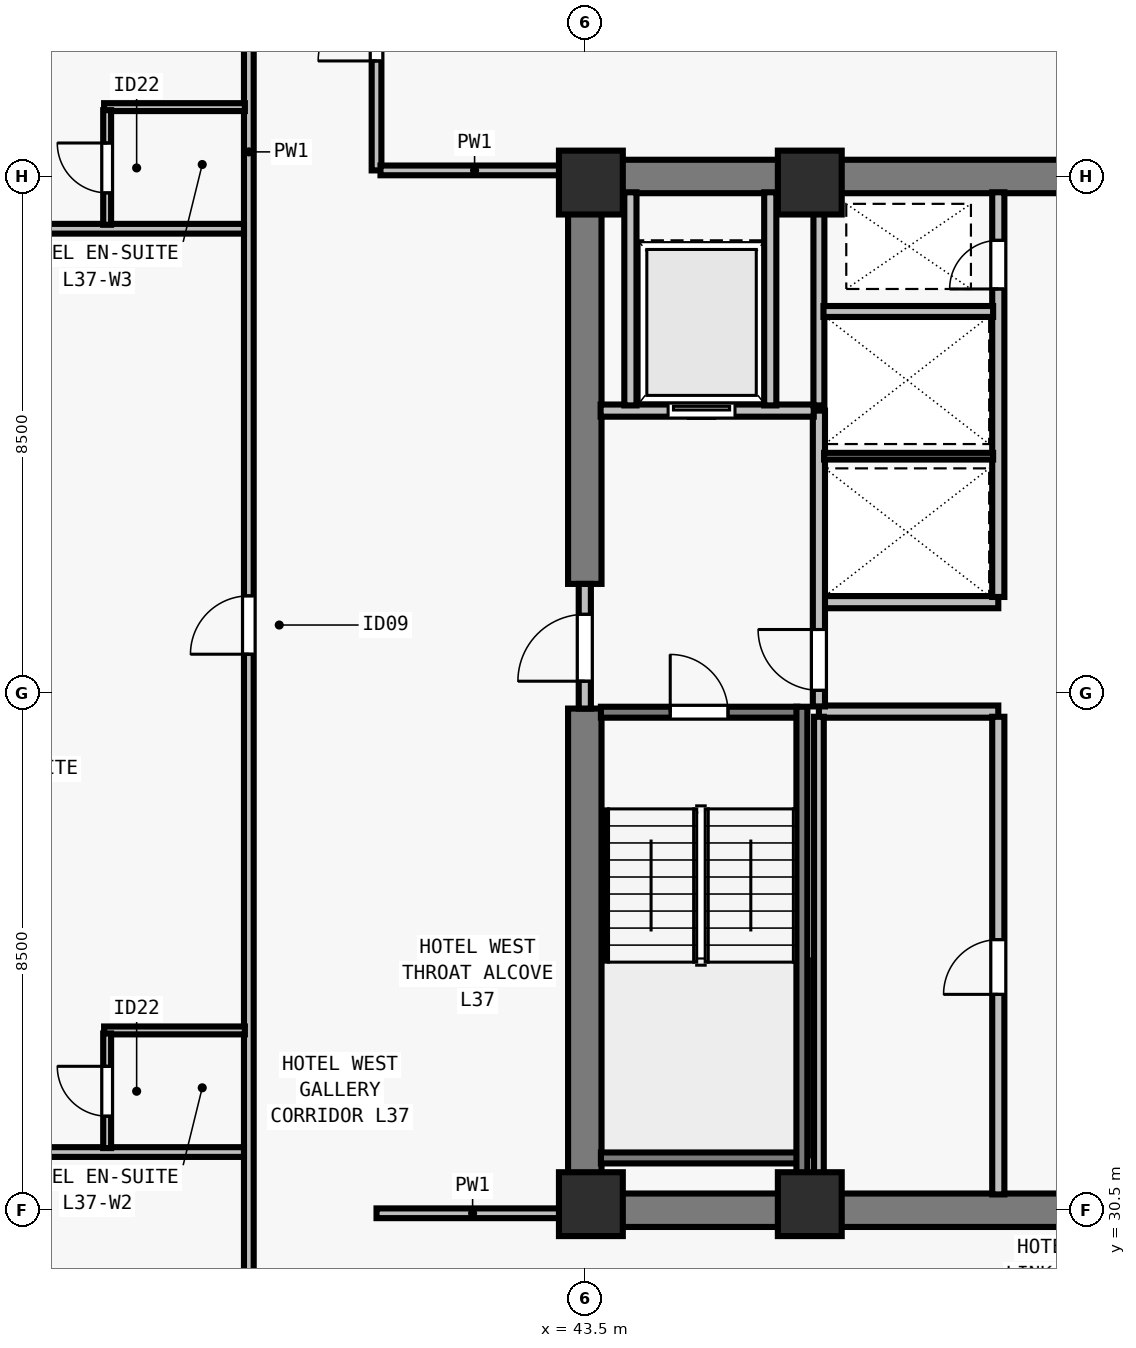
"""IFC4 building model, lengths in metres.
Left out: names, types, materials, properties, quantities, classifications, styles, units other than length and angle.
Written with IfcOpenShell. Run it as: python <this file> out.ifc"""

import sys

from ifc_helpers import new_model, si_unit, direction, frame, frame_2d, origin, origin_2d, place, context, subcontext, project, spatial, rectangle, extrude, element, fill, save


model = new_model("IFC4")
c1 = context("Model", 3, precision=1e-05, world=origin(), true_north=direction((0.0, 1.0)))
c2 = subcontext(c1, "Body", "Model", "MODEL_VIEW")
j1 = project(units=[si_unit("LENGTHUNIT", "METRE"), si_unit("PLANEANGLEUNIT", "RADIAN")], contexts=[c1])
p1 = place(None, origin())
s1 = spatial("IfcSite", under=j1, at=p1, CompositionType="ELEMENT")
p2 = place(p1, origin())
s2 = spatial("IfcBuilding", under=s1, at=p2, CompositionType="ELEMENT")
p3 = place(p2, frame((0.0, 0.0, 137.5)))
s3 = spatial("IfcBuildingStorey", under=s2, at=p3, CompositionType="ELEMENT", Elevation=137.5)
for number, where, z_axis, x_axis in (
    (1, (43.6, 30.6, 0.0), (0.0, 0.0, 1.0), (1.0, 0.0, 0.0)),
    (2, (47.2, 30.6, 0.0), (0.0, 0.0, 1.0), (1.0, 0.0, 0.0)),
    (3, (43.6, 47.4, 0.0), (0.0, 0.0, 1.0), (1.0, 0.0, 0.0)),
    (4, (47.2, 47.4, 0.0), (0.0, 0.0, 1.0), (1.0, 0.0, 0.0)),
):
    element("IfcColumn", number, at=place(p3, frame(where, z_axis=z_axis, x_axis=x_axis)), inside=s3, PredefinedType="COLUMN", context=c2, shape_type="SweptSolid", body=[
        extrude(rectangle(XDim=1.05, YDim=1.05, at=origin_2d()), origin(), (0.0, 0.0, 1.0), 3.5),
    ])
for number, where, z_axis, x_axis in (
    (5, (43.225, 30.5, 0.0), (0.0, 0.0, 1.0), (1.0, 0.0, 0.0)),
    (6, (43.225, 47.5, 0.0), (0.0, 0.0, 1.0), (1.0, 0.0, 0.0)),
):
    element("IfcWall", number, at=place(p3, frame(where, z_axis=z_axis, x_axis=x_axis)), inside=s3, PredefinedType="SHEAR", context=c2, shape_type="SweptSolid", body=[
        extrude(rectangle(XDim=17.55, YDim=0.55, at=frame_2d((8.775, 0.0))), origin(), (0.0, 0.0, 1.0), 3.28),
    ])
p4 = place(p3, frame((43.5, 30.765, 0.0), z_axis=(0.0, 0.0, 1.0), x_axis=(0.0, 1.0, 0.0)))
e7 = element("IfcWall", 7, at=p4, inside=s3, PredefinedType="SHEAR", context=c2, shape_type="SweptSolid", body=[
    extrude(rectangle(XDim=7.985, YDim=0.55, at=frame_2d((3.993, 0.0))), origin(), (0.0, 0.0, 1.0), 3.28),
])
p5 = place(p3, frame((43.5, 40.8, 0.0), z_axis=(0.0, 0.0, 1.0), x_axis=(0.0, 1.0, 0.0)))
e8 = element("IfcWall", 8, at=p5, inside=s3, PredefinedType="SHEAR", context=c2, shape_type="SweptSolid", body=[
    extrude(rectangle(XDim=6.435, YDim=0.55, at=frame_2d((3.218, 0.0))), origin(), (0.0, 0.0, 1.0), 3.28),
])
for number, where, z_axis, x_axis in (
    (9, (47.35, 38.7, 0.0), (0.0, 0.0, 1.0), (1.0, 0.0, 0.0)),
    (10, (47.35, 40.5, 0.0), (0.0, 0.0, 1.0), (1.0, 0.0, 0.0)),
):
    element("IfcWall", number, at=place(p3, frame(where, z_axis=z_axis, x_axis=x_axis)), inside=s3, PredefinedType="SOLIDWALL", context=c2, shape_type="SweptSolid", body=[
        extrude(rectangle(XDim=2.95, YDim=0.2, at=frame_2d((1.475, 0.0))), origin(), (0.0, 0.0, 1.0), 3.28),
    ])
p6 = place(p3, frame((50.3, 30.76, 0.0), z_axis=(0.0, 0.0, 1.0), x_axis=(0.0, 1.0, 0.0)))
e11 = element("IfcWall", 11, at=p6, inside=s3, PredefinedType="SOLIDWALL", context=c2, shape_type="SweptSolid", body=[
    extrude(rectangle(XDim=7.855, YDim=0.2, at=frame_2d((3.927, 0.0))), origin(), (0.0, 0.0, 1.0), 3.28),
])
p7 = place(p6, frame((3.29, 0.0, 0.0)))
e12 = element("IfcOpeningElement", 12, at=p7, cuts=e11, PredefinedType="OPENING", context=c2, shape_type="SweptSolid", body=[
    extrude(rectangle(XDim=0.9, YDim=2.12, at=frame_2d((0.45, 1.06))), frame((0.0, 0.11, 0.0), z_axis=(0.0, -1.0, 0.0), x_axis=(1.0, 0.0, 0.0)), (0.0, 0.0, 1.0), 0.22),
])
p8 = place(p3, frame((50.3, 40.585, 0.0), z_axis=(0.0, 0.0, 1.0), x_axis=(0.0, 1.0, 0.0)))
e13 = element("IfcWall", 13, at=p8, inside=s3, PredefinedType="SOLIDWALL", context=c2, shape_type="SweptSolid", body=[
    extrude(rectangle(XDim=6.655, YDim=0.2, at=frame_2d((3.328, 0.0))), origin(), (0.0, 0.0, 1.0), 3.28),
])
p9 = place(p8, frame((5.065, 0.0, 0.0)))
e14 = element("IfcOpeningElement", 14, at=p9, cuts=e13, PredefinedType="OPENING", context=c2, shape_type="SweptSolid", body=[
    extrude(rectangle(XDim=0.8, YDim=2.08, at=frame_2d((0.4, 1.04))), frame((0.0, 0.11, 0.0), z_axis=(0.0, -1.0, 0.0), x_axis=(1.0, 0.0, 0.0)), (0.0, 0.0, 1.0), 0.22),
])
p10 = place(p3, frame((43.5, 38.75, 0.0), z_axis=(0.0, 0.0, 1.0), x_axis=(0.0, 1.0, 0.0)))
e15 = element("IfcWall", 15, at=p10, inside=s3, PredefinedType="SOLIDWALL", context=c2, shape_type="SweptSolid", body=[
    extrude(rectangle(XDim=2.05, YDim=0.2, at=frame_2d((1.025, 0.0))), origin(), (0.0, 0.0, 1.0), 3.28),
])
p11 = place(p10, frame((0.45, 0.0, 0.0)))
e16 = element("IfcOpeningElement", 16, at=p11, cuts=e15, PredefinedType="OPENING", context=c2, shape_type="SweptSolid", body=[
    extrude(rectangle(XDim=1.1, YDim=2.15, at=frame_2d((0.55, 1.075))), frame((0.0, 0.11, 0.0), z_axis=(0.0, -1.0, 0.0), x_axis=(1.0, 0.0, 0.0)), (0.0, 0.0, 1.0), 0.22),
])
p12 = place(p3, frame((47.35, 38.785, 0.0), z_axis=(0.0, 0.0, 1.0), x_axis=(0.0, 1.0, 0.0)))
e17 = element("IfcWall", 17, at=p12, inside=s3, PredefinedType="SOLIDWALL", context=c2, shape_type="SweptSolid", body=[
    extrude(rectangle(XDim=4.865, YDim=0.2, at=frame_2d((2.433, 0.0))), origin(), (0.0, 0.0, 1.0), 3.28),
])
p13 = place(p12, frame((0.265, 0.0, 0.0)))
e18 = element("IfcOpeningElement", 18, at=p13, cuts=e17, PredefinedType="OPENING", context=c2, shape_type="SweptSolid", body=[
    extrude(rectangle(XDim=1.0, YDim=2.15, at=frame_2d((0.5, 1.075))), frame((0.0, 0.11, 0.0), z_axis=(0.0, -1.0, 0.0), x_axis=(1.0, 0.0, 0.0)), (0.0, 0.0, 1.0), 0.22),
])
p14 = place(p3, frame((43.76, 43.65, 0.0), z_axis=(0.0, 0.0, 1.0), x_axis=(1.0, 0.0, 0.0)))
e19 = element("IfcWall", 19, at=p14, inside=s3, PredefinedType="SOLIDWALL", context=c2, shape_type="SweptSolid", body=[
    extrude(rectangle(XDim=3.505, YDim=0.2, at=frame_2d((1.752, 0.0))), origin(), (0.0, 0.0, 1.0), 3.28),
])
p15 = place(p14, frame((1.11, 0.0, 0.0)))
e20 = element("IfcOpeningElement", 20, at=p15, cuts=e19, PredefinedType="OPENING", context=c2, shape_type="SweptSolid", body=[
    extrude(rectangle(XDim=1.1, YDim=2.2, at=frame_2d((0.55, 1.1))), frame((0.0, 0.11, 0.0), z_axis=(0.0, -1.0, 0.0), x_axis=(1.0, 0.0, 0.0)), (0.0, 0.0, 1.0), 0.22),
])
for number, where, z_axis, x_axis in (
    (21, (46.55, 43.735, 0.0), (0.0, 0.0, 1.0), (0.0, 1.0, 0.0)),
    (22, (44.25, 43.735, 0.0), (0.0, 0.0, 1.0), (0.0, 1.0, 0.0)),
):
    element("IfcWall", number, at=place(p3, frame(where, z_axis=z_axis, x_axis=x_axis)), inside=s3, PredefinedType="SOLIDWALL", context=c2, shape_type="SweptSolid", body=[
        extrude(rectangle(XDim=3.505, YDim=0.2, at=frame_2d((1.752, 0.0))), origin(), (0.0, 0.0, 1.0), 3.28),
    ])
p16 = place(p3, frame((47.35, 30.76, 0.0), z_axis=(0.0, 0.0, 1.0), x_axis=(0.0, 1.0, 0.0)))
e23 = element("IfcWall", 23, at=p16, inside=s3, PredefinedType="PARTITIONING", context=c2, shape_type="SweptSolid", body=[
    extrude(rectangle(XDim=7.855, YDim=0.16, at=frame_2d((3.927, 0.0))), origin(), (0.0, 0.0, 1.0), 3.28),
])
p17 = place(p3, frame((47.35, 43.735, 0.0), z_axis=(0.0, 0.0, 1.0), x_axis=(0.0, 1.0, 0.0)))
e24 = element("IfcWall", 24, at=p17, inside=s3, PredefinedType="SOLIDWALL", context=c2, shape_type="SweptSolid", body=[
    extrude(rectangle(XDim=3.505, YDim=0.18, at=frame_2d((1.752, 0.0))), origin(), (0.0, 0.0, 1.0), 3.28),
])
p18 = place(p3, frame((47.435, 42.9, 0.0), z_axis=(0.0, 0.0, 1.0), x_axis=(1.0, 0.0, 0.0)))
e25 = element("IfcWall", 25, at=p18, inside=s3, PredefinedType="PARTITIONING", context=c2, shape_type="SweptSolid", body=[
    extrude(rectangle(XDim=2.78, YDim=0.11, at=frame_2d((1.39, 0.0))), origin(), (0.0, 0.0, 1.0), 3.28),
])
p19 = place(p3, frame((47.425, 45.28, 0.0), z_axis=(0.0, 0.0, 1.0), x_axis=(1.0, 0.0, 0.0)))
e26 = element("IfcWall", 26, at=p19, inside=s3, PredefinedType="SOLIDWALL", context=c2, shape_type="SweptSolid", body=[
    extrude(rectangle(XDim=2.79, YDim=0.18, at=frame_2d((1.395, 0.0))), origin(), (0.0, 0.0, 1.0), 3.28),
])
p20 = place(p3, frame((37.975, 15.325, 0.0), z_axis=(0.0, 0.0, 1.0), x_axis=(0.0, 1.0, 0.0)))
e27 = element("IfcWall", 27, at=p20, inside=s3, PredefinedType="PARTITIONING", context=c2, shape_type="SweptSolid", body=[
    extrude(rectangle(XDim=47.35, YDim=0.16, at=frame_2d((23.675, 0.0))), origin(), (0.0, 0.0, 1.0), 2.555),
])
p21 = place(p20, frame((8.934, 0.0, 0.0)))
e28 = element("IfcOpeningElement", 28, at=p21, cuts=e27, PredefinedType="OPENING", context=c2, shape_type="SweptSolid", body=[
    extrude(rectangle(XDim=0.96, YDim=2.15, at=frame_2d((0.48, 1.075))), frame((0.0, 0.09, 0.0), z_axis=(0.0, -1.0, 0.0), x_axis=(1.0, 0.0, 0.0)), (0.0, 0.0, 1.0), 0.18),
])
p22 = place(p20, frame((24.319, 0.0, 0.0)))
e29 = element("IfcOpeningElement", 29, at=p22, cuts=e27, PredefinedType="OPENING", context=c2, shape_type="SweptSolid", body=[
    extrude(rectangle(XDim=0.96, YDim=2.15, at=frame_2d((0.48, 1.075))), frame((0.0, 0.09, 0.0), z_axis=(0.0, -1.0, 0.0), x_axis=(1.0, 0.0, 0.0)), (0.0, 0.0, 1.0), 0.18),
])
p23 = place(p20, frame((39.88, 0.0, 0.0)))
e30 = element("IfcOpeningElement", 30, at=p23, cuts=e27, PredefinedType="OPENING", context=c2, shape_type="SweptSolid", body=[
    extrude(rectangle(XDim=0.96, YDim=2.15, at=frame_2d((0.48, 1.075))), frame((0.0, 0.09, 0.0), z_axis=(0.0, -1.0, 0.0), x_axis=(1.0, 0.0, 0.0)), (0.0, 0.0, 1.0), 0.18),
])
p24 = place(p3, frame((40.075, 47.6, 0.0), z_axis=(0.0, 0.0, 1.0), x_axis=(0.0, 1.0, 0.0)))
e31 = element("IfcWall", 31, at=p24, inside=s3, PredefinedType="PARTITIONING", context=c2, shape_type="SweptSolid", body=[
    extrude(rectangle(XDim=15.075, YDim=0.16, at=frame_2d((7.538, 0.0))), origin(), (0.0, 0.0, 1.0), 2.555),
])
p25 = place(p24, frame((1.8, 0.0, 0.0)))
e32 = element("IfcOpeningElement", 32, at=p25, cuts=e31, PredefinedType="OPENING", context=c2, shape_type="SweptSolid", body=[
    extrude(rectangle(XDim=0.96, YDim=2.12, at=frame_2d((0.48, 1.06))), frame((0.0, 0.09, 0.0), z_axis=(0.0, -1.0, 0.0), x_axis=(1.0, 0.0, 0.0)), (0.0, 0.0, 1.0), 0.18),
])
p26 = place(p3, frame((40.075, 30.45, 0.0), z_axis=(0.0, 0.0, 1.0), x_axis=(1.0, 0.0, 0.0)))
e33 = element("IfcWall", 33, at=p26, inside=s3, PredefinedType="PARTITIONING", context=c2, shape_type="SweptSolid", body=[
    extrude(rectangle(XDim=3.16, YDim=0.16, at=frame_2d((1.58, 0.0))), origin(), (0.0, 0.0, 1.0), 3.28),
])
p27 = place(p3, frame((40.14, 47.6, 0.0), z_axis=(0.0, 0.0, 1.0), x_axis=(1.0, 0.0, 0.0)))
e34 = element("IfcWall", 34, at=p27, inside=s3, PredefinedType="PARTITIONING", context=c2, shape_type="SweptSolid", body=[
    extrude(rectangle(XDim=3.095, YDim=0.16, at=frame_2d((1.548, 0.0))), origin(), (0.0, 0.0, 1.0), 3.28),
])
p28 = place(p3, frame((28.27, 31.457, 0.0), z_axis=(0.0, 0.0, 1.0), x_axis=(1.0, 0.0, 0.0)))
e35 = element("IfcWall", 35, at=p28, inside=s3, PredefinedType="PARTITIONING", context=c2, shape_type="SweptSolid", body=[
    extrude(rectangle(XDim=9.625, YDim=0.16, at=frame_2d((4.812, 0.0))), origin(), (0.0, 0.0, 1.0), 3.28),
])
p29 = place(p3, frame((35.595, 33.457, 0.0), z_axis=(0.0, 0.0, 1.0), x_axis=(1.0, 0.0, 0.0)))
e36 = element("IfcWall", 36, at=p29, inside=s3, PredefinedType="PLUMBINGWALL", context=c2, shape_type="SweptSolid", body=[
    extrude(rectangle(XDim=2.315, YDim=0.13, at=frame_2d((1.157, 0.0))), origin(), (0.0, 0.0, 1.0), 3.28),
])
p30 = place(p3, frame((35.645, 31.522, 0.0), z_axis=(0.0, 0.0, 1.0), x_axis=(0.0, 1.0, 0.0)))
e37 = element("IfcWall", 37, at=p30, inside=s3, PredefinedType="PLUMBINGWALL", context=c2, shape_type="SweptSolid", body=[
    extrude(rectangle(XDim=1.885, YDim=0.13, at=frame_2d((0.942, 0.0))), origin(), (0.0, 0.0, 1.0), 3.28),
])
p31 = place(p30, frame((0.525, 0.0, 0.0)))
e38 = element("IfcOpeningElement", 38, at=p31, cuts=e37, PredefinedType="OPENING", context=c2, shape_type="SweptSolid", body=[
    extrude(rectangle(XDim=0.82, YDim=2.1, at=frame_2d((0.41, 1.05))), frame((0.0, 0.075, 0.0), z_axis=(0.0, -1.0, 0.0), x_axis=(1.0, 0.0, 0.0)), (0.0, 0.0, 1.0), 0.15),
])
p32 = place(p3, frame((28.325, 46.641, 0.0), z_axis=(0.0, 0.0, 1.0), x_axis=(1.0, 0.0, 0.0)))
e39 = element("IfcWall", 39, at=p32, inside=s3, PredefinedType="PARTITIONING", context=c2, shape_type="SweptSolid", body=[
    extrude(rectangle(XDim=9.57, YDim=0.16, at=frame_2d((4.785, 0.0))), origin(), (0.0, 0.0, 1.0), 3.28),
])
p33 = place(p3, frame((35.595, 48.641, 0.0), z_axis=(0.0, 0.0, 1.0), x_axis=(1.0, 0.0, 0.0)))
e40 = element("IfcWall", 40, at=p33, inside=s3, PredefinedType="PLUMBINGWALL", context=c2, shape_type="SweptSolid", body=[
    extrude(rectangle(XDim=2.315, YDim=0.13, at=frame_2d((1.157, 0.0))), origin(), (0.0, 0.0, 1.0), 3.28),
])
p34 = place(p3, frame((35.645, 46.706, 0.0), z_axis=(0.0, 0.0, 1.0), x_axis=(0.0, 1.0, 0.0)))
e41 = element("IfcWall", 41, at=p34, inside=s3, PredefinedType="PLUMBINGWALL", context=c2, shape_type="SweptSolid", body=[
    extrude(rectangle(XDim=1.885, YDim=0.13, at=frame_2d((0.942, 0.0))), origin(), (0.0, 0.0, 1.0), 3.28),
])
p35 = place(p34, frame((0.525, 0.0, 0.0)))
e42 = element("IfcOpeningElement", 42, at=p35, cuts=e41, PredefinedType="OPENING", context=c2, shape_type="SweptSolid", body=[
    extrude(rectangle(XDim=0.82, YDim=2.1, at=frame_2d((0.41, 1.05))), frame((0.0, 0.075, 0.0), z_axis=(0.0, -1.0, 0.0), x_axis=(1.0, 0.0, 0.0)), (0.0, 0.0, 1.0), 0.15),
])
p36 = place(p3, frame((43.765, 38.69, 0.0), z_axis=(0.0, 0.0, 1.0), x_axis=(1.0, 0.0, 0.0)))
e43 = element("IfcWall", 43, at=p36, inside=s3, PredefinedType="SOLIDWALL", context=c2, shape_type="SweptSolid", body=[
    extrude(rectangle(XDim=3.23, YDim=0.18, at=frame_2d((1.615, 0.0))), origin(), (0.0, 0.0, 1.0), 3.28),
])
p37 = place(p36, frame((1.14, 0.0, 0.0)))
e44 = element("IfcOpeningElement", 44, at=p37, cuts=e43, PredefinedType="OPENING", context=c2, shape_type="SweptSolid", body=[
    extrude(rectangle(XDim=0.95, YDim=2.15, at=frame_2d((0.475, 1.075))), frame((0.0, 0.1, 0.0), z_axis=(0.0, -1.0, 0.0), x_axis=(1.0, 0.0, 0.0)), (0.0, 0.0, 1.0), 0.2),
])
p38 = place(p3, frame((43.765, 31.36, 0.0), z_axis=(0.0, 0.0, 1.0), x_axis=(1.0, 0.0, 0.0)))
e45 = element("IfcWall", 45, at=p38, inside=s3, PredefinedType="SOLIDWALL", context=c2, shape_type="SweptSolid", body=[
    extrude(rectangle(XDim=3.23, YDim=0.18, at=frame_2d((1.615, 0.0))), origin(), (0.0, 0.0, 1.0), 3.28),
])
p39 = place(p3, frame((47.07, 38.78, 0.0), z_axis=(0.0, 0.0, 1.0), x_axis=(0.0, -1.0, 0.0)))
e46 = element("IfcWall", 46, at=p39, inside=s3, PredefinedType="SOLIDWALL", context=c2, shape_type="SweptSolid", body=[
    extrude(rectangle(XDim=8.017, YDim=0.18, at=frame_2d((4.009, 0.0))), origin(), (0.0, 0.0, 1.0), 3.28),
])
p40 = place(p11, origin())
e47 = element("IfcDoor", 47, at=p40, inside=s3, OperationType="SINGLE_SWING_LEFT", PredefinedType="DOOR", context=c2, shape_type="SweptSolid", body=[
    extrude(rectangle(XDim=1.1, YDim=2.15, at=frame_2d((0.55, 1.075))), frame((0.0, 0.025, 0.0), z_axis=(0.0, -1.0, 0.0), x_axis=(1.0, 0.0, 0.0)), (0.0, 0.0, 1.0), 0.05),
])
fill(e16, e47)
p41 = place(p13, origin())
e48 = element("IfcDoor", 48, at=p41, inside=s3, OperationType="SINGLE_SWING_RIGHT", PredefinedType="DOOR", context=c2, shape_type="SweptSolid", body=[
    extrude(rectangle(XDim=1.0, YDim=2.15, at=frame_2d((0.5, 1.075))), frame((0.0, 0.025, 0.0), z_axis=(0.0, -1.0, 0.0), x_axis=(1.0, 0.0, 0.0)), (0.0, 0.0, 1.0), 0.05),
])
fill(e18, e48)
p42 = place(p15, origin())
e49 = element("IfcDoor", 49, at=p42, inside=s3, OperationType="SLIDING_TO_LEFT", PredefinedType="DOOR", context=c2, shape_type="SweptSolid", body=[
    extrude(rectangle(XDim=1.1, YDim=2.2, at=frame_2d((0.55, 1.1))), frame((0.0, 0.025, 0.0), z_axis=(0.0, -1.0, 0.0), x_axis=(1.0, 0.0, 0.0)), (0.0, 0.0, 1.0), 0.05),
])
fill(e20, e49)
p43 = place(p7, origin())
e50 = element("IfcDoor", 50, at=p43, inside=s3, OperationType="SINGLE_SWING_LEFT", PredefinedType="DOOR", context=c2, shape_type="SweptSolid", body=[
    extrude(rectangle(XDim=0.9, YDim=2.12, at=frame_2d((0.45, 1.06))), frame((0.0, 0.025, 0.0), z_axis=(0.0, -1.0, 0.0), x_axis=(1.0, 0.0, 0.0)), (0.0, 0.0, 1.0), 0.05),
])
fill(e12, e50)
p44 = place(p9, origin())
e51 = element("IfcDoor", 51, at=p44, inside=s3, OperationType="SINGLE_SWING_LEFT", PredefinedType="DOOR", context=c2, shape_type="SweptSolid", body=[
    extrude(rectangle(XDim=0.8, YDim=2.08, at=frame_2d((0.4, 1.04))), frame((0.0, 0.025, 0.0), z_axis=(0.0, -1.0, 0.0), x_axis=(1.0, 0.0, 0.0)), (0.0, 0.0, 1.0), 0.05),
])
fill(e14, e51)
p45 = place(p25, origin())
e52 = element("IfcDoor", 52, at=p45, inside=s3, OperationType="SINGLE_SWING_LEFT", PredefinedType="DOOR", context=c2, shape_type="SweptSolid", body=[
    extrude(rectangle(XDim=0.96, YDim=2.12, at=frame_2d((0.48, 1.06))), frame((0.0, 0.025, 0.0), z_axis=(0.0, -1.0, 0.0), x_axis=(1.0, 0.0, 0.0)), (0.0, 0.0, 1.0), 0.05),
])
fill(e32, e52)
p46 = place(p31, origin())
e53 = element("IfcDoor", 53, at=p46, inside=s3, OperationType="SINGLE_SWING_RIGHT", PredefinedType="DOOR", context=c2, shape_type="SweptSolid", body=[
    extrude(rectangle(XDim=0.82, YDim=2.1, at=frame_2d((0.41, 1.05))), frame((0.0, 0.025, 0.0), z_axis=(0.0, -1.0, 0.0), x_axis=(1.0, 0.0, 0.0)), (0.0, 0.0, 1.0), 0.05),
])
fill(e38, e53)
p47 = place(p22, origin())
e54 = element("IfcDoor", 54, at=p47, inside=s3, OperationType="SINGLE_SWING_LEFT", PredefinedType="DOOR", context=c2, shape_type="SweptSolid", body=[
    extrude(rectangle(XDim=0.96, YDim=2.15, at=frame_2d((0.48, 1.075))), frame((0.0, 0.025, 0.0), z_axis=(0.0, -1.0, 0.0), x_axis=(1.0, 0.0, 0.0)), (0.0, 0.0, 1.0), 0.05),
])
fill(e29, e54)
p48 = place(p35, origin())
e55 = element("IfcDoor", 55, at=p48, inside=s3, OperationType="SINGLE_SWING_RIGHT", PredefinedType="DOOR", context=c2, shape_type="SweptSolid", body=[
    extrude(rectangle(XDim=0.82, YDim=2.1, at=frame_2d((0.41, 1.05))), frame((0.0, 0.025, 0.0), z_axis=(0.0, -1.0, 0.0), x_axis=(1.0, 0.0, 0.0)), (0.0, 0.0, 1.0), 0.05),
])
fill(e42, e55)
p49 = place(p37, origin())
e56 = element("IfcDoor", 56, at=p49, inside=s3, OperationType="SINGLE_SWING_LEFT", PredefinedType="DOOR", context=c2, shape_type="SweptSolid", body=[
    extrude(rectangle(XDim=0.95, YDim=2.15, at=frame_2d((0.475, 1.075))), frame((0.0, 0.025, 0.0), z_axis=(0.0, -1.0, 0.0), x_axis=(1.0, 0.0, 0.0)), (0.0, 0.0, 1.0), 0.05),
])
fill(e44, e56)
save(model, sys.argv[1])
